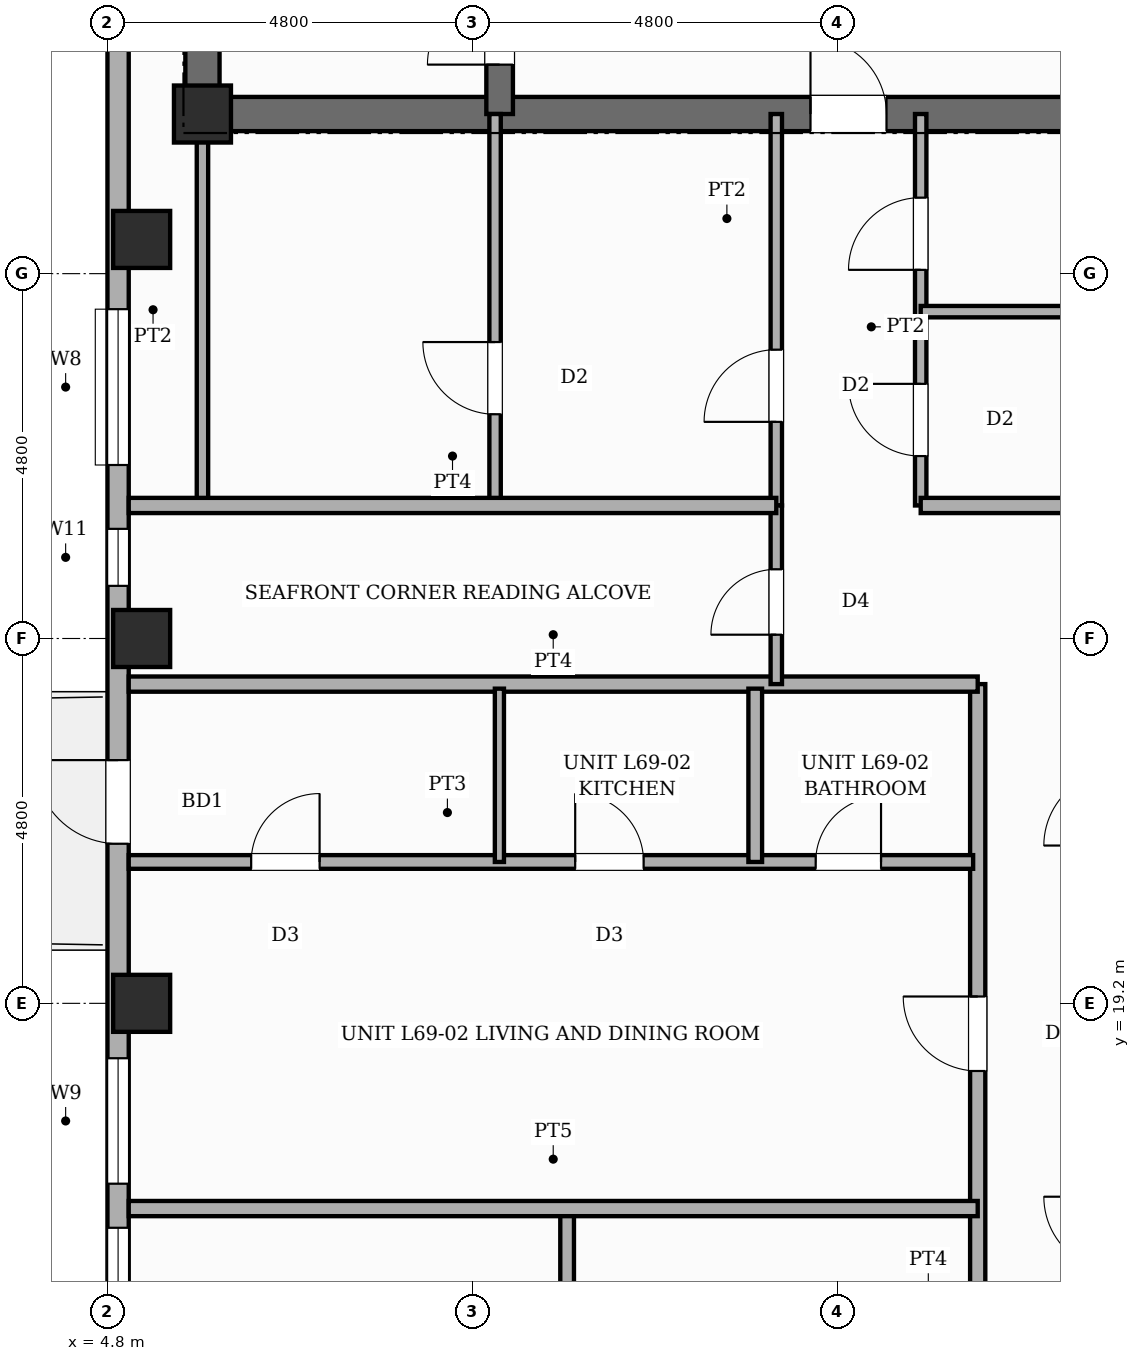
"""IFC4 building model, lengths in metres.
Left out: names, types, materials, properties, quantities, classifications, styles, units other than length and angle.
Written with IfcOpenShell. Run it as: python <this file> out.ifc"""

import sys

from ifc_helpers import new_model, si_unit, direction, frame, frame_2d, origin, origin_2d, place, context, subcontext, project, spatial, rectangle, extrude, element, fill, save


model = new_model("IFC4")
c1 = context("Model", 3, precision=1e-05, world=origin(), true_north=direction((0.0, 1.0)))
c2 = subcontext(c1, "Body", "Model", "MODEL_VIEW")
j1 = project(units=[si_unit("LENGTHUNIT", "METRE"), si_unit("PLANEANGLEUNIT", "RADIAN")], contexts=[c1])
p1 = place(None, origin())
s1 = spatial("IfcSite", under=j1, at=p1, CompositionType="ELEMENT")
p2 = place(p1, origin())
s2 = spatial("IfcBuilding", under=s1, at=p2, CompositionType="ELEMENT")
p3 = place(p2, frame((0.0, 0.0, 265.6)))
s3 = spatial("IfcBuildingStorey", under=s2, at=p3, CompositionType="ELEMENT", Elevation=265.6)
p4 = place(p3, frame((6.05, 30.675, 0.0), z_axis=(0.0, 0.0, 1.0), x_axis=(0.0, 1.0, 0.0)))
e1 = element("IfcWall", 1, at=p4, inside=s3, PredefinedType="SHEAR", context=c2, shape_type="SweptSolid", body=[
    extrude(rectangle(XDim=15.35, YDim=0.45, at=frame_2d((7.675, 0.0))), origin(), (0.0, 0.0, 1.0), 4.3),
])
p5 = place(p4, frame((10.675, 0.0, 0.0)))
e2 = element("IfcOpeningElement", 2, at=p5, cuts=e1, PredefinedType="OPENING", context=c2, shape_type="SweptSolid", body=[
    extrude(rectangle(XDim=0.95, YDim=2.15, at=frame_2d((0.475, 1.075))), frame((0.0, 0.235, 0.0), z_axis=(0.0, -1.0, 0.0), x_axis=(1.0, 0.0, 0.0)), (0.0, 0.0, 1.0), 0.47),
])
p6 = place(p3, frame((6.05, 30.9, 0.0), z_axis=(0.0, 0.0, 1.0), x_axis=(1.0, 0.0, 0.0)))
e3 = element("IfcWall", 3, at=p6, inside=s3, PredefinedType="SHEAR", context=c2, shape_type="SweptSolid", body=[
    extrude(rectangle(XDim=3.91, YDim=0.45, at=frame_2d((1.955, 0.0))), origin(), (0.0, 0.0, 1.0), 4.3),
])
p7 = place(p3, frame((9.96, 30.9, 0.0), z_axis=(0.0, 0.0, 1.0), x_axis=(1.0, 0.0, 0.0)))
e4 = element("IfcWall", 4, at=p7, inside=s3, PredefinedType="SHEAR", context=c2, shape_type="SweptSolid", body=[
    extrude(rectangle(XDim=8.88, YDim=0.45, at=frame_2d((4.44, 0.0))), origin(), (0.0, 0.0, 1.0), 4.3),
])
p8 = place(p7, frame((4.09, 0.0, 0.0)))
e5 = element("IfcOpeningElement", 5, at=p8, cuts=e4, PredefinedType="OPENING", context=c2, shape_type="SweptSolid", body=[
    extrude(rectangle(XDim=1.0, YDim=2.15, at=frame_2d((0.5, 1.075))), frame((0.0, 0.235, 0.0), z_axis=(0.0, -1.0, 0.0), x_axis=(1.0, 0.0, 0.0)), (0.0, 0.0, 1.0), 0.47),
])
p9 = place(p3, frame((9.96, 30.9, 0.0), z_axis=(0.0, 0.0, 1.0), x_axis=(0.0, 1.0, 0.0)))
e6 = element("IfcWall", 6, at=p9, inside=s3, PredefinedType="SHEAR", context=c2, shape_type="SweptSolid", body=[
    extrude(rectangle(XDim=14.9, YDim=0.35, at=frame_2d((7.45, 0.0))), origin(), (0.0, 0.0, 1.0), 4.3),
])
p10 = place(p9, frame((0.65, 0.0, 0.0)))
e7 = element("IfcOpeningElement", 7, at=p10, cuts=e6, PredefinedType="OPENING", context=c2, shape_type="SweptSolid", body=[
    extrude(rectangle(XDim=0.95, YDim=2.1, at=frame_2d((0.475, 1.05))), frame((0.0, 0.185, 0.0), z_axis=(0.0, -1.0, 0.0), x_axis=(1.0, 0.0, 0.0)), (0.0, 0.0, 1.0), 0.37),
])
p11 = place(p9, frame((10.45, 0.0, 0.0)))
e8 = element("IfcOpeningElement", 8, at=p11, cuts=e6, PredefinedType="OPENING", context=c2, shape_type="SweptSolid", body=[
    extrude(rectangle(XDim=1.0, YDim=2.15, at=frame_2d((0.5, 1.075))), frame((0.0, 0.185, 0.0), z_axis=(0.0, -1.0, 0.0), x_axis=(1.0, 0.0, 0.0)), (0.0, 0.0, 1.0), 0.37),
])
for number, where, z_axis, x_axis in (
    (9, (5.25, 19.2, 0.0), (0.0, 0.0, 1.0), (1.0, 0.0, 0.0)),
    (10, (5.25, 24.0, 0.0), (0.0, 0.0, 1.0), (1.0, 0.0, 0.0)),
    (11, (5.25, 29.25, 0.0), (0.0, 0.0, 1.0), (1.0, 0.0, 0.0)),
    (12, (6.05, 30.9, 0.0), (0.0, 0.0, 1.0), (1.0, 0.0, 0.0)),
):
    element("IfcColumn", number, at=place(p3, frame(where, z_axis=z_axis, x_axis=x_axis)), inside=s3, PredefinedType="COLUMN", context=c2, shape_type="SweptSolid", body=[
        extrude(rectangle(XDim=0.75, YDim=0.75, at=origin_2d()), origin(), (0.0, 0.0, 1.0), 4.3),
    ])
p12 = place(p3, frame((4.94, 13.2, 0.0), z_axis=(0.0, 0.0, 1.0), x_axis=(0.0, 1.0, 0.0)))
e13 = element("IfcWall", 13, at=p12, inside=s3, PredefinedType="STANDARD", context=c2, shape_type="SweptSolid", body=[
    extrude(rectangle(XDim=32.4, YDim=0.28, at=frame_2d((16.2, 0.0))), origin(), (0.0, 0.0, 1.0), 3.32),
])
p13 = place(p12, frame((8.1, 0.0, 0.0)))
e14 = element("IfcOpeningElement", 14, at=p13, cuts=e13, PredefinedType="OPENING", context=c2, shape_type="SweptSolid", body=[
    extrude(rectangle(XDim=1.1, YDim=2.15, at=frame_2d((0.55, 1.075))), frame((0.0, 0.15, 0.0), z_axis=(0.0, -1.0, 0.0), x_axis=(1.0, 0.0, 0.0)), (0.0, 0.0, 1.0), 0.3),
])
p14 = place(p12, frame((1.847, 0.0, 0.8)))
e15 = element("IfcOpeningElement", 15, at=p14, cuts=e13, PredefinedType="OPENING", context=c2, shape_type="SweptSolid", body=[
    extrude(rectangle(XDim=1.2, YDim=1.8, at=frame_2d((0.6, 0.9))), frame((0.0, 0.15, 0.0), z_axis=(0.0, -1.0, 0.0), x_axis=(1.0, 0.0, 0.0)), (0.0, 0.0, 1.0), 0.3),
])
p15 = place(p12, frame((3.627, 0.0, 0.8)))
e16 = element("IfcOpeningElement", 16, at=p15, cuts=e13, PredefinedType="OPENING", context=c2, shape_type="SweptSolid", body=[
    extrude(rectangle(XDim=1.65, YDim=1.95, at=frame_2d((0.825, 0.975))), frame((0.0, 0.15, 0.0), z_axis=(0.0, -1.0, 0.0), x_axis=(1.0, 0.0, 0.0)), (0.0, 0.0, 1.0), 0.3),
])
p16 = place(p12, frame((13.083, 0.0, 0.8)))
e17 = element("IfcOpeningElement", 17, at=p16, cuts=e13, PredefinedType="OPENING", context=c2, shape_type="SweptSolid", body=[
    extrude(rectangle(XDim=2.05, YDim=1.95, at=frame_2d((1.025, 0.975))), frame((0.0, 0.15, 0.0), z_axis=(0.0, -1.0, 0.0), x_axis=(1.0, 0.0, 0.0)), (0.0, 0.0, 1.0), 0.3),
])
p17 = place(p12, frame((11.492, 0.0, 0.45)))
e18 = element("IfcOpeningElement", 18, at=p17, cuts=e13, PredefinedType="OPENING", context=c2, shape_type="SweptSolid", body=[
    extrude(rectangle(XDim=0.75, YDim=1.8, at=frame_2d((0.375, 0.9))), frame((0.0, 0.15, 0.0), z_axis=(0.0, -1.0, 0.0), x_axis=(1.0, 0.0, 0.0)), (0.0, 0.0, 1.0), 0.3),
])
p18 = place(p3, frame((13.6, 25.75, 0.0), z_axis=(0.0, 0.0, 1.0), x_axis=(0.0, 1.0, 0.0)))
e19 = element("IfcWall", 19, at=p18, inside=s3, PredefinedType="PARTITIONING", context=c2, shape_type="SweptSolid", body=[
    extrude(rectangle(XDim=5.15, YDim=0.15, at=frame_2d((2.575, 0.0))), origin(), (0.0, 0.0, 1.0), 4.04),
])
p19 = place(p18, frame((1.1, 0.0, 0.0)))
e20 = element("IfcOpeningElement", 20, at=p19, cuts=e19, PredefinedType="OPENING", context=c2, shape_type="SweptSolid", body=[
    extrude(rectangle(XDim=0.95, YDim=2.15, at=frame_2d((0.475, 1.075))), frame((0.0, 0.085, 0.0), z_axis=(0.0, -1.0, 0.0), x_axis=(1.0, 0.0, 0.0)), (0.0, 0.0, 1.0), 0.17),
])
p20 = place(p3, frame((15.5, 25.75, 0.0), z_axis=(0.0, 0.0, 1.0), x_axis=(0.0, 1.0, 0.0)))
e21 = element("IfcWall", 21, at=p20, inside=s3, PredefinedType="PARTITIONING", context=c2, shape_type="SweptSolid", body=[
    extrude(rectangle(XDim=5.15, YDim=0.15, at=frame_2d((2.575, 0.0))), origin(), (0.0, 0.0, 1.0), 4.04),
])
p21 = place(p20, frame((0.65, 0.0, 0.0)))
e22 = element("IfcOpeningElement", 22, at=p21, cuts=e21, PredefinedType="OPENING", context=c2, shape_type="SweptSolid", body=[
    extrude(rectangle(XDim=0.95, YDim=2.15, at=frame_2d((0.475, 1.075))), frame((0.0, 0.085, 0.0), z_axis=(0.0, -1.0, 0.0), x_axis=(1.0, 0.0, 0.0)), (0.0, 0.0, 1.0), 0.17),
])
p22 = place(p20, frame((3.1, 0.0, 0.0)))
e23 = element("IfcOpeningElement", 23, at=p22, cuts=e21, PredefinedType="OPENING", context=c2, shape_type="SweptSolid", body=[
    extrude(rectangle(XDim=0.95, YDim=2.15, at=frame_2d((0.475, 1.075))), frame((0.0, 0.085, 0.0), z_axis=(0.0, -1.0, 0.0), x_axis=(1.0, 0.0, 0.0)), (0.0, 0.0, 1.0), 0.17),
])
p23 = place(p3, frame((6.05, 25.75, 0.0), z_axis=(0.0, 0.0, 1.0), x_axis=(0.0, 1.0, 0.0)))
e24 = element("IfcWall", 24, at=p23, inside=s3, PredefinedType="PARTITIONING", context=c2, shape_type="SweptSolid", body=[
    extrude(rectangle(XDim=5.15, YDim=0.15, at=frame_2d((2.575, 0.0))), origin(), (0.0, 0.0, 1.0), 4.04),
])
p24 = place(p3, frame((9.9, 25.75, 0.0), z_axis=(0.0, 0.0, 1.0), x_axis=(0.0, 1.0, 0.0)))
e25 = element("IfcWall", 25, at=p24, inside=s3, PredefinedType="PARTITIONING", context=c2, shape_type="SweptSolid", body=[
    extrude(rectangle(XDim=5.15, YDim=0.15, at=frame_2d((2.575, 0.0))), origin(), (0.0, 0.0, 1.0), 4.04),
])
p25 = place(p24, frame((1.2, 0.0, 0.0)))
e26 = element("IfcOpeningElement", 26, at=p25, cuts=e25, PredefinedType="OPENING", context=c2, shape_type="SweptSolid", body=[
    extrude(rectangle(XDim=0.95, YDim=2.15, at=frame_2d((0.475, 1.075))), frame((0.0, 0.085, 0.0), z_axis=(0.0, -1.0, 0.0), x_axis=(1.0, 0.0, 0.0)), (0.0, 0.0, 1.0), 0.17),
])
p26 = place(p3, frame((15.5, 28.3, 0.0), z_axis=(0.0, 0.0, 1.0), x_axis=(1.0, 0.0, 0.0)))
e27 = element("IfcWall", 27, at=p26, inside=s3, PredefinedType="PARTITIONING", context=c2, shape_type="SweptSolid", body=[
    extrude(rectangle(XDim=7.25, YDim=0.15, at=frame_2d((3.625, 0.0))), origin(), (0.0, 0.0, 1.0), 4.04),
])
p27 = place(p3, frame((16.25, 11.08, 0.0), z_axis=(0.0, 0.0, 1.0), x_axis=(0.0, 1.0, 0.0)))
e28 = element("IfcWall", 28, at=p27, inside=s3, PredefinedType="PARTITIONING", context=c2, shape_type="SweptSolid", body=[
    extrude(rectangle(XDim=12.32, YDim=0.2, at=frame_2d((6.16, 0.0))), origin(), (0.0, 0.0, 1.0), 4.04),
])
p28 = place(p27, frame((0.56, 0.0, 0.0)))
e29 = element("IfcOpeningElement", 29, at=p28, cuts=e28, PredefinedType="OPENING", context=c2, shape_type="SweptSolid", body=[
    extrude(rectangle(XDim=0.98, YDim=2.18, at=frame_2d((0.49, 1.09))), frame((0.0, 0.11, 0.0), z_axis=(0.0, -1.0, 0.0), x_axis=(1.0, 0.0, 0.0)), (0.0, 0.0, 1.0), 0.22),
])
p29 = place(p27, frame((7.23, 0.0, 0.0)))
e30 = element("IfcOpeningElement", 30, at=p29, cuts=e28, PredefinedType="OPENING", context=c2, shape_type="SweptSolid", body=[
    extrude(rectangle(XDim=0.98, YDim=2.18, at=frame_2d((0.49, 1.09))), frame((0.0, 0.11, 0.0), z_axis=(0.0, -1.0, 0.0), x_axis=(1.0, 0.0, 0.0)), (0.0, 0.0, 1.0), 0.22),
])
p30 = place(p3, frame((5.08, 23.4, 0.0), z_axis=(0.0, 0.0, 1.0), x_axis=(1.0, 0.0, 0.0)))
e31 = element("IfcWall", 31, at=p30, inside=s3, PredefinedType="PARTITIONING", context=c2, shape_type="SweptSolid", body=[
    extrude(rectangle(XDim=11.17, YDim=0.2, at=frame_2d((5.585, 0.0))), origin(), (0.0, 0.0, 1.0), 4.04),
])
p31 = place(p3, frame((15.5, 25.75, 0.0), z_axis=(0.0, 0.0, 1.0), x_axis=(1.0, 0.0, 0.0)))
e32 = element("IfcWall", 32, at=p31, inside=s3, PredefinedType="PARTITIONING", context=c2, shape_type="SweptSolid", body=[
    extrude(rectangle(XDim=8.22, YDim=0.2, at=frame_2d((4.11, 0.0))), origin(), (0.0, 0.0, 1.0), 4.04),
])
p32 = place(p3, frame((13.6, 23.4, 0.0), z_axis=(0.0, 0.0, 1.0), x_axis=(0.0, 1.0, 0.0)))
e33 = element("IfcWall", 33, at=p32, inside=s3, PredefinedType="PARTITIONING", context=c2, shape_type="SweptSolid", body=[
    extrude(rectangle(XDim=2.35, YDim=0.15, at=frame_2d((1.175, 0.0))), origin(), (0.0, 0.0, 1.0), 4.04),
])
p33 = place(p32, frame((0.65, 0.0, 0.0)))
e34 = element("IfcOpeningElement", 34, at=p33, cuts=e33, PredefinedType="OPENING", context=c2, shape_type="SweptSolid", body=[
    extrude(rectangle(XDim=0.86, YDim=2.1, at=frame_2d((0.43, 1.05))), frame((0.0, 0.085, 0.0), z_axis=(0.0, -1.0, 0.0), x_axis=(1.0, 0.0, 0.0)), (0.0, 0.0, 1.0), 0.17),
])
p34 = place(p3, frame((5.08, 25.75, 0.0), z_axis=(0.0, 0.0, 1.0), x_axis=(1.0, 0.0, 0.0)))
e35 = element("IfcWall", 35, at=p34, inside=s3, PredefinedType="PARTITIONING", context=c2, shape_type="SweptSolid", body=[
    extrude(rectangle(XDim=8.52, YDim=0.2, at=frame_2d((4.26, 0.0))), origin(), (0.0, 0.0, 1.0), 4.04),
])
p35 = place(p3, frame((10.848, 13.18, 0.0), z_axis=(0.0, 0.0, 1.0), x_axis=(0.0, 1.0, 0.0)))
e36 = element("IfcWall", 36, at=p35, inside=s3, PredefinedType="PLUMBINGWALL", context=c2, shape_type="SweptSolid", body=[
    extrude(rectangle(XDim=3.36, YDim=0.18, at=frame_2d((1.68, 0.0))), origin(), (0.0, 0.0, 1.0), 4.04),
])
p36 = place(p3, frame((5.08, 16.5, 0.0), z_axis=(0.0, 0.0, 1.0), x_axis=(1.0, 0.0, 0.0)))
e37 = element("IfcWall", 37, at=p36, inside=s3, PredefinedType="SOLIDWALL", context=c2, shape_type="SweptSolid", body=[
    extrude(rectangle(XDim=11.17, YDim=0.2, at=frame_2d((5.585, 0.0))), origin(), (0.0, 0.0, 1.0), 4.04),
])
p37 = place(p3, frame((5.08, 21.06, 0.0), z_axis=(0.0, 0.0, 1.0), x_axis=(1.0, 0.0, 0.0)))
e38 = element("IfcWall", 38, at=p37, inside=s3, PredefinedType="PLUMBINGWALL", context=c2, shape_type="SweptSolid", body=[
    extrude(rectangle(XDim=11.11, YDim=0.18, at=frame_2d((5.555, 0.0))), origin(), (0.0, 0.0, 1.0), 4.04),
])
p38 = place(p37, frame((1.611, 0.0, 0.0)))
e39 = element("IfcOpeningElement", 39, at=p38, cuts=e38, PredefinedType="OPENING", context=c2, shape_type="SweptSolid", body=[
    extrude(rectangle(XDim=0.9, YDim=2.15, at=frame_2d((0.45, 1.075))), frame((0.0, 0.1, 0.0), z_axis=(0.0, -1.0, 0.0), x_axis=(1.0, 0.0, 0.0)), (0.0, 0.0, 1.0), 0.2),
])
p39 = place(p37, frame((5.874, 0.0, 0.0)))
e40 = element("IfcOpeningElement", 40, at=p39, cuts=e38, PredefinedType="OPENING", context=c2, shape_type="SweptSolid", body=[
    extrude(rectangle(XDim=0.9, YDim=2.15, at=frame_2d((0.45, 1.075))), frame((0.0, 0.1, 0.0), z_axis=(0.0, -1.0, 0.0), x_axis=(1.0, 0.0, 0.0)), (0.0, 0.0, 1.0), 0.2),
])
p40 = place(p37, frame((9.038, 0.0, 0.0)))
e41 = element("IfcOpeningElement", 41, at=p40, cuts=e38, PredefinedType="OPENING", context=c2, shape_type="SweptSolid", body=[
    extrude(rectangle(XDim=0.86, YDim=2.1, at=frame_2d((0.43, 1.05))), frame((0.0, 0.1, 0.0), z_axis=(0.0, -1.0, 0.0), x_axis=(1.0, 0.0, 0.0)), (0.0, 0.0, 1.0), 0.2),
])
p41 = place(p3, frame((9.957, 21.06, 0.0), z_axis=(0.0, 0.0, 1.0), x_axis=(0.0, 1.0, 0.0)))
e42 = element("IfcWall", 42, at=p41, inside=s3, PredefinedType="PARTITIONING", context=c2, shape_type="SweptSolid", body=[
    extrude(rectangle(XDim=2.28, YDim=0.12, at=frame_2d((1.14, 0.0))), origin(), (0.0, 0.0, 1.0), 4.04),
])
p42 = place(p3, frame((13.323, 21.06, 0.0), z_axis=(0.0, 0.0, 1.0), x_axis=(0.0, 1.0, 0.0)))
e43 = element("IfcWall", 43, at=p42, inside=s3, PredefinedType="PLUMBINGWALL", context=c2, shape_type="SweptSolid", body=[
    extrude(rectangle(XDim=2.28, YDim=0.18, at=frame_2d((1.14, 0.0))), origin(), (0.0, 0.0, 1.0), 4.04),
])
p43 = place(p13, origin())
e44 = element("IfcDoor", 44, at=p43, inside=s3, OperationType="SINGLE_SWING_RIGHT", PredefinedType="DOOR", context=c2, shape_type="SweptSolid", body=[
    extrude(rectangle(XDim=1.1, YDim=2.15, at=frame_2d((0.55, 1.075))), frame((0.0, 0.025, 0.0), z_axis=(0.0, -1.0, 0.0), x_axis=(1.0, 0.0, 0.0)), (0.0, 0.0, 1.0), 0.05),
])
fill(e14, e44)
p44 = place(p14, origin())
e45 = element("IfcWindow", 45, at=p44, inside=s3, PartitioningType="SINGLE_PANEL", PredefinedType="WINDOW", context=c2, shape_type="SweptSolid", body=[
    extrude(rectangle(XDim=1.2, YDim=1.8, at=frame_2d((0.6, 0.9))), frame((0.0, 0.03, 0.0), z_axis=(0.0, -1.0, 0.0), x_axis=(1.0, 0.0, 0.0)), (0.0, 0.0, 1.0), 0.06),
])
fill(e15, e45)
p45 = place(p15, origin())
e46 = element("IfcWindow", 46, at=p45, inside=s3, PartitioningType="SINGLE_PANEL", PredefinedType="WINDOW", context=c2, shape_type="SweptSolid", body=[
    extrude(rectangle(XDim=1.65, YDim=1.95, at=frame_2d((0.825, 0.975))), frame((0.0, 0.03, 0.0), z_axis=(0.0, -1.0, 0.0), x_axis=(1.0, 0.0, 0.0)), (0.0, 0.0, 1.0), 0.06),
])
fill(e16, e46)
p46 = place(p16, origin())
e47 = element("IfcWindow", 47, at=p46, inside=s3, PartitioningType="SINGLE_PANEL", PredefinedType="WINDOW", context=c2, shape_type="SweptSolid", body=[
    extrude(rectangle(XDim=2.05, YDim=1.95, at=frame_2d((1.025, 0.975))), frame((0.0, 0.03, 0.0), z_axis=(0.0, -1.0, 0.0), x_axis=(1.0, 0.0, 0.0)), (0.0, 0.0, 1.0), 0.06),
])
fill(e17, e47)
p47 = place(p17, origin())
e48 = element("IfcWindow", 48, at=p47, inside=s3, PartitioningType="SINGLE_PANEL", PredefinedType="WINDOW", context=c2, shape_type="SweptSolid", body=[
    extrude(rectangle(XDim=0.75, YDim=1.8, at=frame_2d((0.375, 0.9))), frame((0.0, 0.03, 0.0), z_axis=(0.0, -1.0, 0.0), x_axis=(1.0, 0.0, 0.0)), (0.0, 0.0, 1.0), 0.06),
])
fill(e18, e48)
p48 = place(p10, origin())
e49 = element("IfcDoor", 49, at=p48, inside=s3, OperationType="SINGLE_SWING_LEFT", PredefinedType="DOOR", context=c2, shape_type="SweptSolid", body=[
    extrude(rectangle(XDim=0.95, YDim=2.1, at=frame_2d((0.475, 1.05))), frame((0.0, 0.025, 0.0), z_axis=(0.0, -1.0, 0.0), x_axis=(1.0, 0.0, 0.0)), (0.0, 0.0, 1.0), 0.05),
])
fill(e7, e49)
p49 = place(p8, origin())
e50 = element("IfcDoor", 50, at=p49, inside=s3, OperationType="SINGLE_SWING_LEFT", PredefinedType="DOOR", context=c2, shape_type="SweptSolid", body=[
    extrude(rectangle(XDim=1.0, YDim=2.15, at=frame_2d((0.5, 1.075))), frame((0.0, 0.025, 0.0), z_axis=(0.0, -1.0, 0.0), x_axis=(1.0, 0.0, 0.0)), (0.0, 0.0, 1.0), 0.05),
])
fill(e5, e50)
p50 = place(p19, origin())
e51 = element("IfcDoor", 51, at=p50, inside=s3, OperationType="SINGLE_SWING_LEFT", PredefinedType="DOOR", context=c2, shape_type="SweptSolid", body=[
    extrude(rectangle(XDim=0.95, YDim=2.15, at=frame_2d((0.475, 1.075))), frame((0.0, 0.025, 0.0), z_axis=(0.0, -1.0, 0.0), x_axis=(1.0, 0.0, 0.0)), (0.0, 0.0, 1.0), 0.05),
])
fill(e20, e51)
p51 = place(p25, origin())
e52 = element("IfcDoor", 52, at=p51, inside=s3, OperationType="SINGLE_SWING_RIGHT", PredefinedType="DOOR", context=c2, shape_type="SweptSolid", body=[
    extrude(rectangle(XDim=0.95, YDim=2.15, at=frame_2d((0.475, 1.075))), frame((0.0, 0.025, 0.0), z_axis=(0.0, -1.0, 0.0), x_axis=(1.0, 0.0, 0.0)), (0.0, 0.0, 1.0), 0.05),
])
fill(e26, e52)
p52 = place(p21, origin())
e53 = element("IfcDoor", 53, at=p52, inside=s3, OperationType="SINGLE_SWING_RIGHT", PredefinedType="DOOR", context=c2, shape_type="SweptSolid", body=[
    extrude(rectangle(XDim=0.95, YDim=2.15, at=frame_2d((0.475, 1.075))), frame((0.0, 0.025, 0.0), z_axis=(0.0, -1.0, 0.0), x_axis=(1.0, 0.0, 0.0)), (0.0, 0.0, 1.0), 0.05),
])
fill(e22, e53)
p53 = place(p22, origin())
e54 = element("IfcDoor", 54, at=p53, inside=s3, OperationType="SINGLE_SWING_LEFT", PredefinedType="DOOR", context=c2, shape_type="SweptSolid", body=[
    extrude(rectangle(XDim=0.95, YDim=2.15, at=frame_2d((0.475, 1.075))), frame((0.0, 0.025, 0.0), z_axis=(0.0, -1.0, 0.0), x_axis=(1.0, 0.0, 0.0)), (0.0, 0.0, 1.0), 0.05),
])
fill(e23, e54)
p54 = place(p33, origin())
e55 = element("IfcDoor", 55, at=p54, inside=s3, OperationType="SINGLE_SWING_LEFT", PredefinedType="DOOR", context=c2, shape_type="SweptSolid", body=[
    extrude(rectangle(XDim=0.86, YDim=2.1, at=frame_2d((0.43, 1.05))), frame((0.0, 0.025, 0.0), z_axis=(0.0, -1.0, 0.0), x_axis=(1.0, 0.0, 0.0)), (0.0, 0.0, 1.0), 0.05),
])
fill(e34, e55)
p55 = place(p29, origin())
e56 = element("IfcDoor", 56, at=p55, inside=s3, OperationType="SINGLE_SWING_RIGHT", PredefinedType="DOOR", context=c2, shape_type="SweptSolid", body=[
    extrude(rectangle(XDim=0.98, YDim=2.18, at=frame_2d((0.49, 1.09))), frame((0.0, 0.025, 0.0), z_axis=(0.0, -1.0, 0.0), x_axis=(1.0, 0.0, 0.0)), (0.0, 0.0, 1.0), 0.05),
])
fill(e30, e56)
p56 = place(p38, origin())
e57 = element("IfcDoor", 57, at=p56, inside=s3, OperationType="SINGLE_SWING_RIGHT", PredefinedType="DOOR", context=c2, shape_type="SweptSolid", body=[
    extrude(rectangle(XDim=0.9, YDim=2.15, at=frame_2d((0.45, 1.075))), frame((0.0, 0.025, 0.0), z_axis=(0.0, -1.0, 0.0), x_axis=(1.0, 0.0, 0.0)), (0.0, 0.0, 1.0), 0.05),
])
fill(e39, e57)
p57 = place(p39, origin())
e58 = element("IfcDoor", 58, at=p57, inside=s3, OperationType="SINGLE_SWING_LEFT", PredefinedType="DOOR", context=c2, shape_type="SweptSolid", body=[
    extrude(rectangle(XDim=0.9, YDim=2.15, at=frame_2d((0.45, 1.075))), frame((0.0, 0.025, 0.0), z_axis=(0.0, -1.0, 0.0), x_axis=(1.0, 0.0, 0.0)), (0.0, 0.0, 1.0), 0.05),
])
fill(e40, e58)
p58 = place(p40, origin())
e59 = element("IfcDoor", 59, at=p58, inside=s3, OperationType="SINGLE_SWING_RIGHT", PredefinedType="DOOR", context=c2, shape_type="SweptSolid", body=[
    extrude(rectangle(XDim=0.86, YDim=2.1, at=frame_2d((0.43, 1.05))), frame((0.0, 0.025, 0.0), z_axis=(0.0, -1.0, 0.0), x_axis=(1.0, 0.0, 0.0)), (0.0, 0.0, 1.0), 0.05),
])
fill(e41, e59)
save(model, sys.argv[1])
